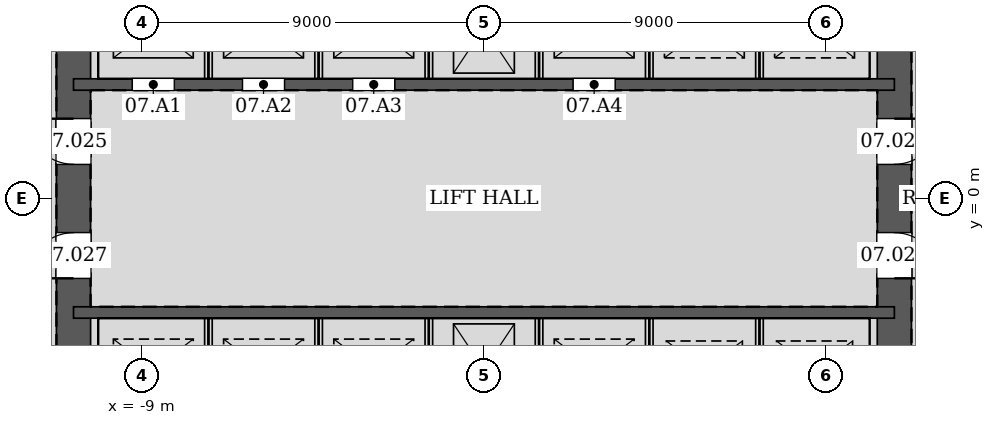
"""IFC4 building model, lengths in metres.
Left out: names, types, materials, properties, quantities, classifications, styles, units other than length and angle.
Written with IfcOpenShell. Run it as: python <this file> out.ifc"""

import sys

from ifc_helpers import new_model, si_unit, direction, frame, frame_2d, origin, place, context, subcontext, project, spatial, rectangle, extrude, element, fill, save


model = new_model("IFC4")
c1 = context("Model", 3, precision=1e-05, world=origin(), true_north=direction((0.0, 1.0)))
c2 = subcontext(c1, "Body", "Model", "MODEL_VIEW")
j1 = project(units=[si_unit("LENGTHUNIT", "METRE"), si_unit("PLANEANGLEUNIT", "RADIAN")], contexts=[c1])
p1 = place(None, origin())
s1 = spatial("IfcSite", under=j1, at=p1, CompositionType="ELEMENT")
p2 = place(p1, origin())
s2 = spatial("IfcBuilding", under=s1, at=p2, CompositionType="ELEMENT")
p3 = place(p2, frame((0.0, 0.0, 37.2)))
s3 = spatial("IfcBuildingStorey", under=s2, at=p3, CompositionType="ELEMENT", Elevation=37.2)
p4 = place(p3, frame((10.8, -10.8, 0.0), z_axis=(0.0, 0.0, 1.0), x_axis=(0.0, 1.0, 0.0)))
e1 = element("IfcWall", 1, at=p4, inside=s3, PredefinedType="SOLIDWALL", context=c2, shape_type="SweptSolid", body=[
    extrude(rectangle(XDim=21.6, YDim=0.9, at=frame_2d((10.8, 0.0))), origin(), (0.0, 0.0, 1.0), 4.2),
])
p5 = place(p4, frame((11.7, 0.0, 0.0)))
e2 = element("IfcOpeningElement", 2, at=p5, cuts=e1, PredefinedType="OPENING", context=c2, shape_type="SweptSolid", body=[
    extrude(rectangle(XDim=1.2, YDim=2.1, at=frame_2d((0.6, 1.05))), frame((0.0, 0.46, 0.0), z_axis=(0.0, -1.0, 0.0), x_axis=(1.0, 0.0, 0.0)), (0.0, 0.0, 1.0), 0.92),
])
p6 = place(p4, frame((8.7, 0.0, 0.0)))
e3 = element("IfcOpeningElement", 3, at=p6, cuts=e1, PredefinedType="OPENING", context=c2, shape_type="SweptSolid", body=[
    extrude(rectangle(XDim=1.2, YDim=2.1, at=frame_2d((0.6, 1.05))), frame((0.0, 0.46, 0.0), z_axis=(0.0, -1.0, 0.0), x_axis=(1.0, 0.0, 0.0)), (0.0, 0.0, 1.0), 0.92),
])
p7 = place(p3, frame((-10.8, 10.8, 0.0), z_axis=(0.0, 0.0, 1.0), x_axis=(0.0, -1.0, 0.0)))
e4 = element("IfcWall", 4, at=p7, inside=s3, PredefinedType="SOLIDWALL", context=c2, shape_type="SweptSolid", body=[
    extrude(rectangle(XDim=21.6, YDim=0.9, at=frame_2d((10.8, 0.0))), origin(), (0.0, 0.0, 1.0), 4.2),
])
p8 = place(p7, frame((8.7, 0.0, 0.0)))
e5 = element("IfcOpeningElement", 5, at=p8, cuts=e4, PredefinedType="OPENING", context=c2, shape_type="SweptSolid", body=[
    extrude(rectangle(XDim=1.2, YDim=2.1, at=frame_2d((0.6, 1.05))), frame((0.0, 0.46, 0.0), z_axis=(0.0, -1.0, 0.0), x_axis=(1.0, 0.0, 0.0)), (0.0, 0.0, 1.0), 0.92),
])
p9 = place(p7, frame((11.7, 0.0, 0.0)))
e6 = element("IfcOpeningElement", 6, at=p9, cuts=e4, PredefinedType="OPENING", context=c2, shape_type="SweptSolid", body=[
    extrude(rectangle(XDim=1.2, YDim=2.1, at=frame_2d((0.6, 1.05))), frame((0.0, 0.46, 0.0), z_axis=(0.0, -1.0, 0.0), x_axis=(1.0, 0.0, 0.0)), (0.0, 0.0, 1.0), 0.92),
])
p10 = place(p3, frame((-10.8, 3.0, 0.0), z_axis=(0.0, 0.0, 1.0), x_axis=(1.0, 0.0, 0.0)))
e7 = element("IfcWall", 7, at=p10, inside=s3, PredefinedType="SOLIDWALL", context=c2, shape_type="SweptSolid", body=[
    extrude(rectangle(XDim=21.6, YDim=0.3, at=frame_2d((10.8, 0.0))), origin(), (0.0, 0.0, 1.0), 4.2),
])
p11 = place(p10, frame((1.55, 0.0, 0.0)))
e8 = element("IfcOpeningElement", 8, at=p11, cuts=e7, PredefinedType="OPENING", context=c2, shape_type="SweptSolid", body=[
    extrude(rectangle(XDim=1.1, YDim=2.1, at=frame_2d((0.55, 1.05))), frame((0.0, 0.16, 0.0), z_axis=(0.0, -1.0, 0.0), x_axis=(1.0, 0.0, 0.0)), (0.0, 0.0, 1.0), 0.32),
])
p12 = place(p10, frame((4.45, 0.0, 0.0)))
e9 = element("IfcOpeningElement", 9, at=p12, cuts=e7, PredefinedType="OPENING", context=c2, shape_type="SweptSolid", body=[
    extrude(rectangle(XDim=1.1, YDim=2.1, at=frame_2d((0.55, 1.05))), frame((0.0, 0.16, 0.0), z_axis=(0.0, -1.0, 0.0), x_axis=(1.0, 0.0, 0.0)), (0.0, 0.0, 1.0), 0.32),
])
p13 = place(p10, frame((7.35, 0.0, 0.0)))
e10 = element("IfcOpeningElement", 10, at=p13, cuts=e7, PredefinedType="OPENING", context=c2, shape_type="SweptSolid", body=[
    extrude(rectangle(XDim=1.1, YDim=2.1, at=frame_2d((0.55, 1.05))), frame((0.0, 0.16, 0.0), z_axis=(0.0, -1.0, 0.0), x_axis=(1.0, 0.0, 0.0)), (0.0, 0.0, 1.0), 0.32),
])
p14 = place(p10, frame((13.15, 0.0, 0.0)))
e11 = element("IfcOpeningElement", 11, at=p14, cuts=e7, PredefinedType="OPENING", context=c2, shape_type="SweptSolid", body=[
    extrude(rectangle(XDim=1.1, YDim=2.1, at=frame_2d((0.55, 1.05))), frame((0.0, 0.16, 0.0), z_axis=(0.0, -1.0, 0.0), x_axis=(1.0, 0.0, 0.0)), (0.0, 0.0, 1.0), 0.32),
])
p15 = place(p3, frame((-10.8, -3.0, 0.0), z_axis=(0.0, 0.0, 1.0), x_axis=(1.0, 0.0, 0.0)))
e12 = element("IfcWall", 12, at=p15, inside=s3, PredefinedType="SOLIDWALL", context=c2, shape_type="SweptSolid", body=[
    extrude(rectangle(XDim=21.6, YDim=0.3, at=frame_2d((10.8, 0.0))), origin(), (0.0, 0.0, 1.0), 4.2),
])
for number, where, z_axis, x_axis in (
    (13, (-7.25, 3.15, 0.0), (0.0, 0.0, 1.0), (0.0, 1.0, 0.0)),
    (14, (-4.35, 3.15, 0.0), (0.0, 0.0, 1.0), (0.0, 1.0, 0.0)),
    (15, (-1.45, 3.15, 0.0), (0.0, 0.0, 1.0), (0.0, 1.0, 0.0)),
    (16, (1.45, 3.15, 0.0), (0.0, 0.0, 1.0), (0.0, 1.0, 0.0)),
    (17, (4.35, 3.15, 0.0), (0.0, 0.0, 1.0), (0.0, 1.0, 0.0)),
    (18, (7.25, 3.15, 0.0), (0.0, 0.0, 1.0), (0.0, 1.0, 0.0)),
    (19, (-7.25, -5.85, 0.0), (0.0, 0.0, 1.0), (0.0, 1.0, 0.0)),
    (20, (-4.35, -5.85, 0.0), (0.0, 0.0, 1.0), (0.0, 1.0, 0.0)),
    (21, (-1.45, -5.85, 0.0), (0.0, 0.0, 1.0), (0.0, 1.0, 0.0)),
    (22, (1.45, -5.85, 0.0), (0.0, 0.0, 1.0), (0.0, 1.0, 0.0)),
    (23, (4.35, -5.85, 0.0), (0.0, 0.0, 1.0), (0.0, 1.0, 0.0)),
    (24, (7.25, -5.85, 0.0), (0.0, 0.0, 1.0), (0.0, 1.0, 0.0)),
):
    element("IfcWall", number, at=place(p3, frame(where, z_axis=z_axis, x_axis=x_axis)), inside=s3, PredefinedType="PARTITIONING", context=c2, shape_type="SweptSolid", body=[
        extrude(rectangle(XDim=2.7, YDim=0.2, at=frame_2d((1.35, 0.0))), origin(), (0.0, 0.0, 1.0), 4.2),
    ])
p16 = place(p5, frame((1.2, 0.0, 0.0), z_axis=(0.0, 0.0, 1.0), x_axis=(-1.0, 0.0, 0.0)))
e25 = element("IfcDoor", 25, at=p16, inside=s3, OperationType="SINGLE_SWING_LEFT", PredefinedType="DOOR", context=c2, shape_type="SweptSolid", body=[
    extrude(rectangle(XDim=1.2, YDim=2.1, at=frame_2d((0.6, 1.05))), frame((0.0, 0.025, 0.0), z_axis=(0.0, -1.0, 0.0), x_axis=(1.0, 0.0, 0.0)), (0.0, 0.0, 1.0), 0.05),
])
fill(e2, e25)
p17 = place(p8, frame((1.2, 0.0, 0.0), z_axis=(0.0, 0.0, 1.0), x_axis=(-1.0, 0.0, 0.0)))
e26 = element("IfcDoor", 26, at=p17, inside=s3, OperationType="SINGLE_SWING_RIGHT", PredefinedType="DOOR", context=c2, shape_type="SweptSolid", body=[
    extrude(rectangle(XDim=1.2, YDim=2.1, at=frame_2d((0.6, 1.05))), frame((0.0, 0.025, 0.0), z_axis=(0.0, -1.0, 0.0), x_axis=(1.0, 0.0, 0.0)), (0.0, 0.0, 1.0), 0.05),
])
fill(e5, e26)
p18 = place(p6, frame((1.2, 0.0, 0.0), z_axis=(0.0, 0.0, 1.0), x_axis=(-1.0, 0.0, 0.0)))
e27 = element("IfcDoor", 27, at=p18, inside=s3, OperationType="SINGLE_SWING_RIGHT", PredefinedType="DOOR", context=c2, shape_type="SweptSolid", body=[
    extrude(rectangle(XDim=1.2, YDim=2.1, at=frame_2d((0.6, 1.05))), frame((0.0, 0.025, 0.0), z_axis=(0.0, -1.0, 0.0), x_axis=(1.0, 0.0, 0.0)), (0.0, 0.0, 1.0), 0.05),
])
fill(e3, e27)
p19 = place(p9, frame((1.2, 0.0, 0.0), z_axis=(0.0, 0.0, 1.0), x_axis=(-1.0, 0.0, 0.0)))
e28 = element("IfcDoor", 28, at=p19, inside=s3, OperationType="SINGLE_SWING_LEFT", PredefinedType="DOOR", context=c2, shape_type="SweptSolid", body=[
    extrude(rectangle(XDim=1.2, YDim=2.1, at=frame_2d((0.6, 1.05))), frame((0.0, 0.025, 0.0), z_axis=(0.0, -1.0, 0.0), x_axis=(1.0, 0.0, 0.0)), (0.0, 0.0, 1.0), 0.05),
])
fill(e6, e28)
p20 = place(p11, origin())
e29 = element("IfcDoor", 29, at=p20, inside=s3, OperationType="DOUBLE_DOOR_SLIDING", PredefinedType="DOOR", context=c2, shape_type="SweptSolid", body=[
    extrude(rectangle(XDim=1.1, YDim=2.1, at=frame_2d((0.55, 1.05))), frame((0.0, 0.025, 0.0), z_axis=(0.0, -1.0, 0.0), x_axis=(1.0, 0.0, 0.0)), (0.0, 0.0, 1.0), 0.05),
])
fill(e8, e29)
p21 = place(p12, origin())
e30 = element("IfcDoor", 30, at=p21, inside=s3, OperationType="DOUBLE_DOOR_SLIDING", PredefinedType="DOOR", context=c2, shape_type="SweptSolid", body=[
    extrude(rectangle(XDim=1.1, YDim=2.1, at=frame_2d((0.55, 1.05))), frame((0.0, 0.025, 0.0), z_axis=(0.0, -1.0, 0.0), x_axis=(1.0, 0.0, 0.0)), (0.0, 0.0, 1.0), 0.05),
])
fill(e9, e30)
p22 = place(p13, origin())
e31 = element("IfcDoor", 31, at=p22, inside=s3, OperationType="DOUBLE_DOOR_SLIDING", PredefinedType="DOOR", context=c2, shape_type="SweptSolid", body=[
    extrude(rectangle(XDim=1.1, YDim=2.1, at=frame_2d((0.55, 1.05))), frame((0.0, 0.025, 0.0), z_axis=(0.0, -1.0, 0.0), x_axis=(1.0, 0.0, 0.0)), (0.0, 0.0, 1.0), 0.05),
])
fill(e10, e31)
p23 = place(p14, origin())
e32 = element("IfcDoor", 32, at=p23, inside=s3, OperationType="DOUBLE_DOOR_SLIDING", PredefinedType="DOOR", context=c2, shape_type="SweptSolid", body=[
    extrude(rectangle(XDim=1.1, YDim=2.1, at=frame_2d((0.55, 1.05))), frame((0.0, 0.025, 0.0), z_axis=(0.0, -1.0, 0.0), x_axis=(1.0, 0.0, 0.0)), (0.0, 0.0, 1.0), 0.05),
])
fill(e11, e32)
save(model, sys.argv[1])
